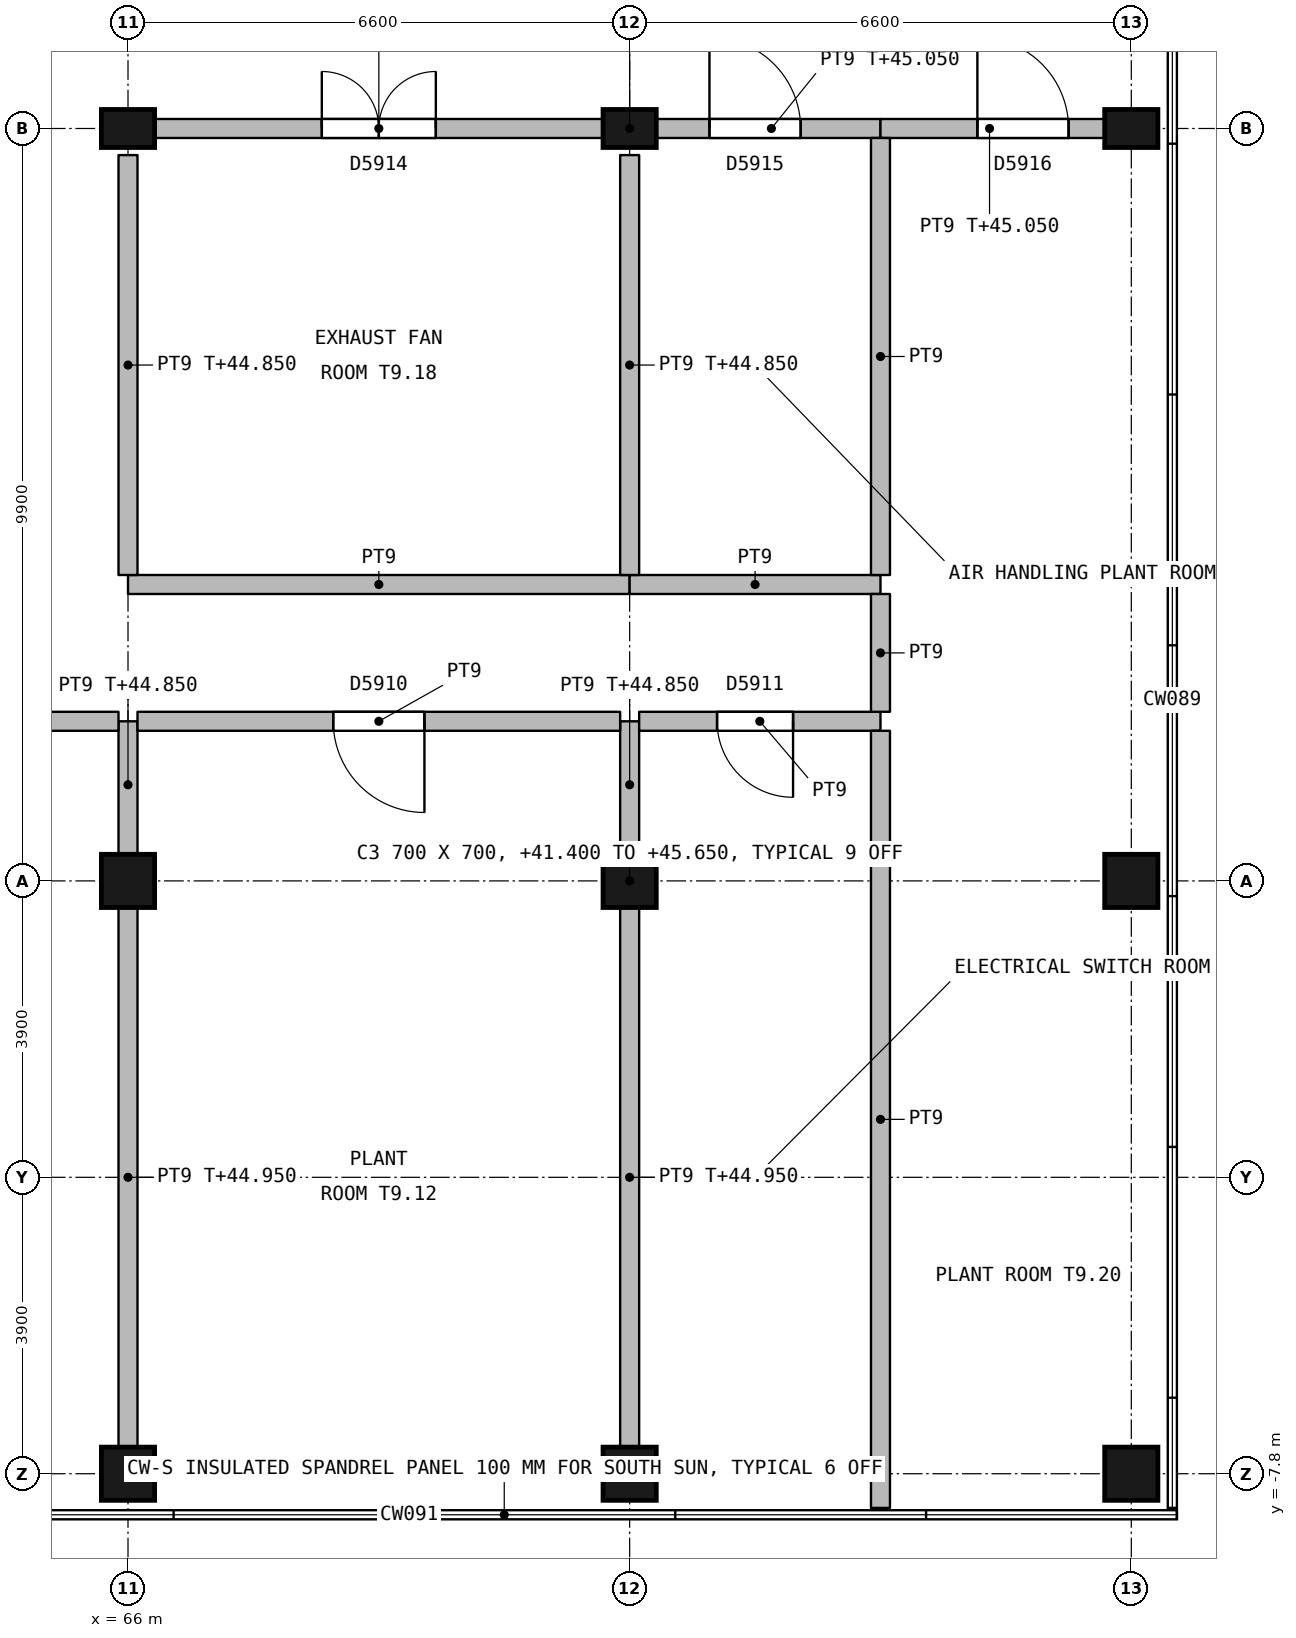
"""IFC4 building model, lengths in metres.
Left out: names, types, materials, properties, quantities, classifications, styles, units other than length and angle.
Written with IfcOpenShell. Run it as: python <this file> out.ifc"""

import sys

from ifc_helpers import new_model, si_unit, direction, frame, frame_2d, origin, origin_2d, place, context, subcontext, project, spatial, rectangle, extrude, element, fill, save


model = new_model("IFC4")
c1 = context("Model", 3, precision=1e-05, world=origin(), true_north=direction((0.0, 1.0)))
c2 = subcontext(c1, "Body", "Model", "MODEL_VIEW")
j1 = project(units=[si_unit("LENGTHUNIT", "METRE"), si_unit("PLANEANGLEUNIT", "RADIAN")], contexts=[c1])
p1 = place(None, origin())
s1 = spatial("IfcSite", under=j1, at=p1, CompositionType="ELEMENT")
p2 = place(p1, origin())
s2 = spatial("IfcBuilding", under=s1, at=p2, CompositionType="ELEMENT")
p3 = place(p2, frame((0.0, 0.0, 41.4)))
s3 = spatial("IfcBuildingStorey", under=s2, at=p3, CompositionType="ELEMENT", Elevation=41.4)
for number, where, z_axis, x_axis in (
    (1, (66.0, -7.8, 0.0), (0.0, 0.0, 1.0), (1.0, 0.0, 0.0)),
    (2, (66.0, 0.0, 0.0), (0.0, 0.0, 1.0), (1.0, 0.0, 0.0)),
):
    element("IfcColumn", number, at=place(p3, frame(where, z_axis=z_axis, x_axis=x_axis)), inside=s3, PredefinedType="COLUMN", context=c2, shape_type="SweptSolid", body=[
        extrude(rectangle(XDim=0.7, YDim=0.7, at=origin_2d()), origin(), (0.0, 0.0, 1.0), 4.25),
    ])
p4 = place(p3, frame((66.0, 9.9, 0.0), z_axis=(0.0, 0.0, 1.0), x_axis=(1.0, 0.0, 0.0)))
e3 = element("IfcColumn", 3, at=p4, inside=s3, PredefinedType="COLUMN", context=c2, shape_type="SweptSolid", body=[
    extrude(rectangle(XDim=0.7, YDim=0.5, at=origin_2d()), origin(), (0.0, 0.0, 1.0), 4.25),
])
for number, where, z_axis, x_axis in (
    (4, (72.6, -7.8, 0.0), (0.0, 0.0, 1.0), (1.0, 0.0, 0.0)),
    (5, (72.6, 0.0, 0.0), (0.0, 0.0, 1.0), (1.0, 0.0, 0.0)),
):
    element("IfcColumn", number, at=place(p3, frame(where, z_axis=z_axis, x_axis=x_axis)), inside=s3, PredefinedType="COLUMN", context=c2, shape_type="SweptSolid", body=[
        extrude(rectangle(XDim=0.7, YDim=0.7, at=origin_2d()), origin(), (0.0, 0.0, 1.0), 4.25),
    ])
p5 = place(p3, frame((72.6, 9.9, 0.0), z_axis=(0.0, 0.0, 1.0), x_axis=(1.0, 0.0, 0.0)))
e6 = element("IfcColumn", 6, at=p5, inside=s3, PredefinedType="COLUMN", context=c2, shape_type="SweptSolid", body=[
    extrude(rectangle(XDim=0.7, YDim=0.5, at=origin_2d()), origin(), (0.0, 0.0, 1.0), 4.25),
])
for number, where, z_axis, x_axis in (
    (7, (79.2, -7.8, 0.0), (0.0, 0.0, 1.0), (1.0, 0.0, 0.0)),
    (8, (79.2, 0.0, 0.0), (0.0, 0.0, 1.0), (1.0, 0.0, 0.0)),
):
    element("IfcColumn", number, at=place(p3, frame(where, z_axis=z_axis, x_axis=x_axis)), inside=s3, PredefinedType="COLUMN", context=c2, shape_type="SweptSolid", body=[
        extrude(rectangle(XDim=0.7, YDim=0.7, at=origin_2d()), origin(), (0.0, 0.0, 1.0), 4.25),
    ])
p6 = place(p3, frame((79.2, 9.9, 0.0), z_axis=(0.0, 0.0, 1.0), x_axis=(1.0, 0.0, 0.0)))
e9 = element("IfcColumn", 9, at=p6, inside=s3, PredefinedType="COLUMN", context=c2, shape_type="SweptSolid", body=[
    extrude(rectangle(XDim=0.7, YDim=0.5, at=origin_2d()), origin(), (0.0, 0.0, 1.0), 4.25),
])
p7 = place(p3, frame((66.35, 9.9, 0.0), z_axis=(0.0, 0.0, 1.0), x_axis=(1.0, 0.0, 0.0)))
e10 = element("IfcWall", 10, at=p7, inside=s3, PredefinedType="PARTITIONING", context=c2, shape_type="SweptSolid", body=[
    extrude(rectangle(XDim=5.9, YDim=0.25, at=frame_2d((2.95, 0.0))), origin(), (0.0, 0.0, 1.0), 3.65),
])
p8 = place(p7, frame((2.2, 0.0, 0.0)))
e11 = element("IfcOpeningElement", 11, at=p8, cuts=e10, PredefinedType="OPENING", context=c2, shape_type="SweptSolid", body=[
    extrude(rectangle(XDim=1.5, YDim=2.4, at=frame_2d((0.75, 1.2))), frame((0.0, 0.135, 0.0), z_axis=(0.0, -1.0, 0.0), x_axis=(1.0, 0.0, 0.0)), (0.0, 0.0, 1.0), 0.27),
])
p9 = place(p3, frame((72.95, 9.9, 0.0), z_axis=(0.0, 0.0, 1.0), x_axis=(1.0, 0.0, 0.0)))
e12 = element("IfcWall", 12, at=p9, inside=s3, PredefinedType="PARTITIONING", context=c2, shape_type="SweptSolid", body=[
    extrude(rectangle(XDim=2.95, YDim=0.25, at=frame_2d((1.475, 0.0))), origin(), (0.0, 0.0, 1.0), 3.65),
])
p10 = place(p9, frame((0.7, 0.0, 0.0)))
e13 = element("IfcOpeningElement", 13, at=p10, cuts=e12, PredefinedType="OPENING", context=c2, shape_type="SweptSolid", body=[
    extrude(rectangle(XDim=1.2, YDim=2.1, at=frame_2d((0.6, 1.05))), frame((0.0, 0.135, 0.0), z_axis=(0.0, -1.0, 0.0), x_axis=(1.0, 0.0, 0.0)), (0.0, 0.0, 1.0), 0.27),
])
p11 = place(p3, frame((75.9, 9.9, 0.0), z_axis=(0.0, 0.0, 1.0), x_axis=(1.0, 0.0, 0.0)))
e14 = element("IfcWall", 14, at=p11, inside=s3, PredefinedType="PARTITIONING", context=c2, shape_type="SweptSolid", body=[
    extrude(rectangle(XDim=2.95, YDim=0.25, at=frame_2d((1.475, 0.0))), origin(), (0.0, 0.0, 1.0), 3.65),
])
p12 = place(p11, frame((1.275, 0.0, 0.0)))
e15 = element("IfcOpeningElement", 15, at=p12, cuts=e14, PredefinedType="OPENING", context=c2, shape_type="SweptSolid", body=[
    extrude(rectangle(XDim=1.2, YDim=2.4, at=frame_2d((0.6, 1.2))), frame((0.0, 0.135, 0.0), z_axis=(0.0, -1.0, 0.0), x_axis=(1.0, 0.0, 0.0)), (0.0, 0.0, 1.0), 0.27),
])
p13 = place(p3, frame((66.0, -7.45, 0.0), z_axis=(0.0, 0.0, 1.0), x_axis=(0.0, 1.0, 0.0)))
e16 = element("IfcWall", 16, at=p13, inside=s3, PredefinedType="PARTITIONING", context=c2, shape_type="SweptSolid", body=[
    extrude(rectangle(XDim=7.1, YDim=0.25, at=frame_2d((3.55, 0.0))), origin(), (0.0, 0.0, 1.0), 3.55),
])
p14 = place(p3, frame((66.0, 0.35, 0.0), z_axis=(0.0, 0.0, 1.0), x_axis=(0.0, 1.0, 0.0)))
e17 = element("IfcWall", 17, at=p14, inside=s3, PredefinedType="PARTITIONING", context=c2, shape_type="SweptSolid", body=[
    extrude(rectangle(XDim=1.75, YDim=0.25, at=frame_2d((0.875, 0.0))), origin(), (0.0, 0.0, 1.0), 3.45),
])
p15 = place(p3, frame((65.875, 2.1, 0.0), z_axis=(0.0, 0.0, 1.0), x_axis=(-1.0, 0.0, 0.0)))
e18 = element("IfcWall", 18, at=p15, inside=s3, PredefinedType="PARTITIONING", context=c2, shape_type="SweptSolid", body=[
    extrude(rectangle(XDim=6.475, YDim=0.25, at=frame_2d((3.237, 0.0))), origin(), (0.0, 0.0, 1.0), 4.25),
])
p16 = place(p15, frame((2.425, 0.0, 0.0)))
e19 = element("IfcOpeningElement", 19, at=p16, cuts=e18, PredefinedType="OPENING", context=c2, shape_type="SweptSolid", body=[
    extrude(rectangle(XDim=1.5, YDim=2.4, at=frame_2d((0.75, 1.2))), frame((0.0, 0.135, 0.0), z_axis=(0.0, -1.0, 0.0), x_axis=(1.0, 0.0, 0.0)), (0.0, 0.0, 1.0), 0.27),
])
p17 = place(p3, frame((72.6, -7.45, 0.0), z_axis=(0.0, 0.0, 1.0), x_axis=(0.0, 1.0, 0.0)))
e20 = element("IfcWall", 20, at=p17, inside=s3, PredefinedType="PARTITIONING", context=c2, shape_type="SweptSolid", body=[
    extrude(rectangle(XDim=7.1, YDim=0.25, at=frame_2d((3.55, 0.0))), origin(), (0.0, 0.0, 1.0), 3.55),
])
p18 = place(p3, frame((72.6, 0.35, 0.0), z_axis=(0.0, 0.0, 1.0), x_axis=(0.0, 1.0, 0.0)))
e21 = element("IfcWall", 21, at=p18, inside=s3, PredefinedType="PARTITIONING", context=c2, shape_type="SweptSolid", body=[
    extrude(rectangle(XDim=1.75, YDim=0.25, at=frame_2d((0.875, 0.0))), origin(), (0.0, 0.0, 1.0), 3.45),
])
p19 = place(p3, frame((72.475, 2.1, 0.0), z_axis=(0.0, 0.0, 1.0), x_axis=(-1.0, 0.0, 0.0)))
e22 = element("IfcWall", 22, at=p19, inside=s3, PredefinedType="PARTITIONING", context=c2, shape_type="SweptSolid", body=[
    extrude(rectangle(XDim=6.35, YDim=0.25, at=frame_2d((3.175, 0.0))), origin(), (0.0, 0.0, 1.0), 4.25),
])
p20 = place(p19, frame((2.575, 0.0, 0.0)))
e23 = element("IfcOpeningElement", 23, at=p20, cuts=e22, PredefinedType="OPENING", context=c2, shape_type="SweptSolid", body=[
    extrude(rectangle(XDim=1.2, YDim=2.4, at=frame_2d((0.6, 1.2))), frame((0.0, 0.135, 0.0), z_axis=(0.0, -1.0, 0.0), x_axis=(1.0, 0.0, 0.0)), (0.0, 0.0, 1.0), 0.27),
])
p21 = place(p3, frame((75.9, 2.1, 0.0), z_axis=(0.0, 0.0, 1.0), x_axis=(-1.0, 0.0, 0.0)))
e24 = element("IfcWall", 24, at=p21, inside=s3, PredefinedType="PARTITIONING", context=c2, shape_type="SweptSolid", body=[
    extrude(rectangle(XDim=3.175, YDim=0.25, at=frame_2d((1.587, 0.0))), origin(), (0.0, 0.0, 1.0), 4.25),
])
p22 = place(p21, frame((1.15, 0.0, 0.0)))
e25 = element("IfcOpeningElement", 25, at=p22, cuts=e24, PredefinedType="OPENING", context=c2, shape_type="SweptSolid", body=[
    extrude(rectangle(XDim=1.0, YDim=2.4, at=frame_2d((0.5, 1.2))), frame((0.0, 0.135, 0.0), z_axis=(0.0, -1.0, 0.0), x_axis=(1.0, 0.0, 0.0)), (0.0, 0.0, 1.0), 0.27),
])
p23 = place(p3, frame((75.9, -8.25, 0.0), z_axis=(0.0, 0.0, 1.0), x_axis=(0.0, 1.0, 0.0)))
e26 = element("IfcWall", 26, at=p23, inside=s3, PredefinedType="PARTITIONING", context=c2, shape_type="SweptSolid", body=[
    extrude(rectangle(XDim=10.225, YDim=0.25, at=frame_2d((5.113, 0.0))), origin(), (0.0, 0.0, 1.0), 4.25),
])
p24 = place(p3, frame((72.6, 3.9, 0.0), z_axis=(0.0, 0.0, 1.0), x_axis=(-1.0, 0.0, 0.0)))
e27 = element("IfcWall", 27, at=p24, inside=s3, PredefinedType="PARTITIONING", context=c2, shape_type="SweptSolid", body=[
    extrude(rectangle(XDim=6.6, YDim=0.25, at=frame_2d((3.3, 0.0))), origin(), (0.0, 0.0, 1.0), 4.25),
])
p25 = place(p3, frame((75.9, 3.9, 0.0), z_axis=(0.0, 0.0, 1.0), x_axis=(-1.0, 0.0, 0.0)))
e28 = element("IfcWall", 28, at=p25, inside=s3, PredefinedType="PARTITIONING", context=c2, shape_type="SweptSolid", body=[
    extrude(rectangle(XDim=3.3, YDim=0.25, at=frame_2d((1.65, 0.0))), origin(), (0.0, 0.0, 1.0), 4.25),
])
p26 = place(p3, frame((75.9, 2.225, 0.0), z_axis=(0.0, 0.0, 1.0), x_axis=(0.0, 1.0, 0.0)))
e29 = element("IfcWall", 29, at=p26, inside=s3, PredefinedType="PARTITIONING", context=c2, shape_type="SweptSolid", body=[
    extrude(rectangle(XDim=1.55, YDim=0.25, at=frame_2d((0.775, 0.0))), origin(), (0.0, 0.0, 1.0), 4.25),
])
for number, where, z_axis, x_axis in (
    (30, (66.0, 4.025, 0.0), (0.0, 0.0, 1.0), (0.0, 1.0, 0.0)),
    (31, (72.6, 4.025, 0.0), (0.0, 0.0, 1.0), (0.0, 1.0, 0.0)),
):
    element("IfcWall", number, at=place(p3, frame(where, z_axis=z_axis, x_axis=x_axis)), inside=s3, PredefinedType="PARTITIONING", context=c2, shape_type="SweptSolid", body=[
        extrude(rectangle(XDim=5.525, YDim=0.25, at=frame_2d((2.763, 0.0))), origin(), (0.0, 0.0, 1.0), 3.45),
    ])
p27 = place(p3, frame((75.9, 4.025, 0.0), z_axis=(0.0, 0.0, 1.0), x_axis=(0.0, 1.0, 0.0)))
e32 = element("IfcWall", 32, at=p27, inside=s3, PredefinedType="PARTITIONING", context=c2, shape_type="SweptSolid", body=[
    extrude(rectangle(XDim=5.75, YDim=0.25, at=frame_2d((2.875, 0.0))), origin(), (0.0, 0.0, 1.0), 4.25),
])
p28 = place(p20, origin())
e33 = element("IfcDoor", 33, at=p28, inside=s3, OperationType="SINGLE_SWING_LEFT", PredefinedType="DOOR", context=c2, shape_type="SweptSolid", body=[
    extrude(rectangle(XDim=1.2, YDim=2.4, at=frame_2d((0.6, 1.2))), frame((0.0, 0.03, 0.0), z_axis=(0.0, -1.0, 0.0), x_axis=(1.0, 0.0, 0.0)), (0.0, 0.0, 1.0), 0.06),
])
fill(e23, e33)
p29 = place(p22, origin())
e34 = element("IfcDoor", 34, at=p29, inside=s3, OperationType="SINGLE_SWING_LEFT", PredefinedType="DOOR", context=c2, shape_type="SweptSolid", body=[
    extrude(rectangle(XDim=1.0, YDim=2.4, at=frame_2d((0.5, 1.2))), frame((0.0, 0.03, 0.0), z_axis=(0.0, -1.0, 0.0), x_axis=(1.0, 0.0, 0.0)), (0.0, 0.0, 1.0), 0.06),
])
fill(e25, e34)
p30 = place(p8, origin())
e35 = element("IfcDoor", 35, at=p30, inside=s3, OperationType="DOUBLE_DOOR_SINGLE_SWING", PredefinedType="DOOR", context=c2, shape_type="SweptSolid", body=[
    extrude(rectangle(XDim=1.5, YDim=2.4, at=frame_2d((0.75, 1.2))), frame((0.0, 0.03, 0.0), z_axis=(0.0, -1.0, 0.0), x_axis=(1.0, 0.0, 0.0)), (0.0, 0.0, 1.0), 0.06),
])
fill(e11, e35)
p31 = place(p10, origin())
e36 = element("IfcDoor", 36, at=p31, inside=s3, OperationType="SINGLE_SWING_LEFT", PredefinedType="DOOR", context=c2, shape_type="SweptSolid", body=[
    extrude(rectangle(XDim=1.2, YDim=2.1, at=frame_2d((0.6, 1.05))), frame((0.0, 0.03, 0.0), z_axis=(0.0, -1.0, 0.0), x_axis=(1.0, 0.0, 0.0)), (0.0, 0.0, 1.0), 0.06),
])
fill(e13, e36)
p32 = place(p12, origin())
e37 = element("IfcDoor", 37, at=p32, inside=s3, OperationType="SINGLE_SWING_LEFT", PredefinedType="DOOR", context=c2, shape_type="SweptSolid", body=[
    extrude(rectangle(XDim=1.2, YDim=2.4, at=frame_2d((0.6, 1.2))), frame((0.0, 0.03, 0.0), z_axis=(0.0, -1.0, 0.0), x_axis=(1.0, 0.0, 0.0)), (0.0, 0.0, 1.0), 0.06),
])
fill(e15, e37)
save(model, sys.argv[1])
